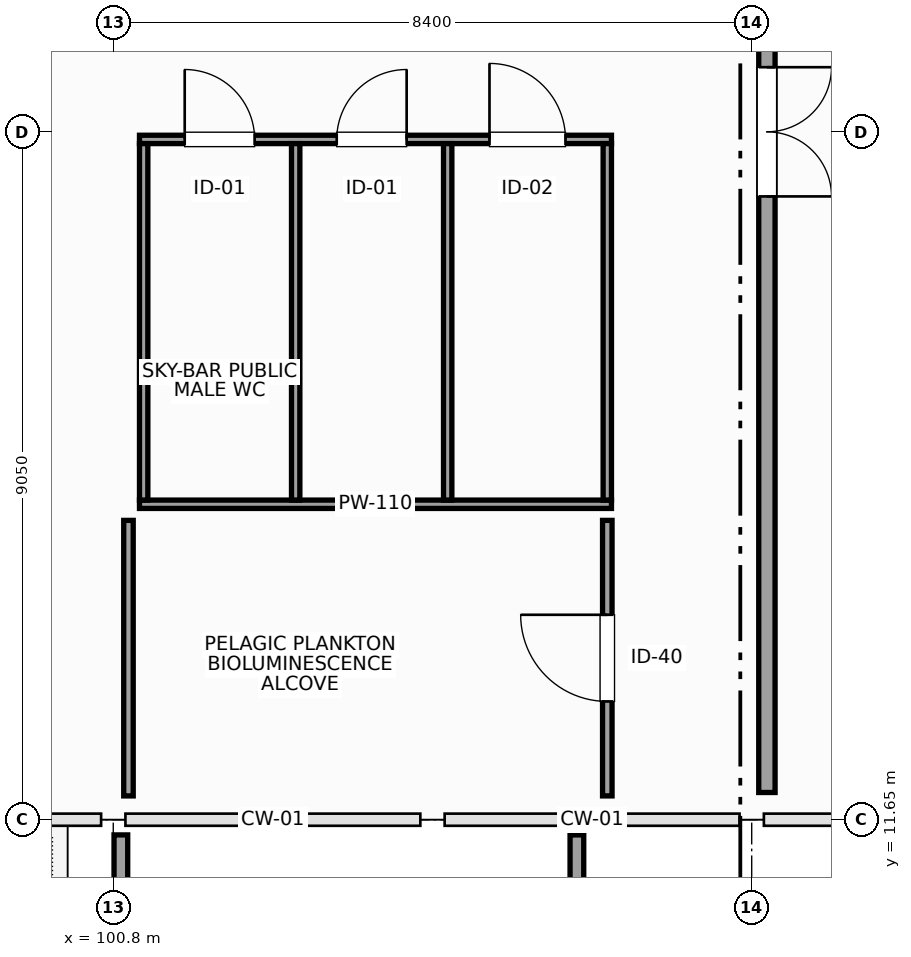
"""IFC4 building model, lengths in metres.
Left out: names, types, materials, properties, quantities, classifications, styles, units other than length and angle.
Written with IfcOpenShell. Run it as: python <this file> out.ifc"""

import sys

from ifc_helpers import new_model, si_unit, direction, frame, frame_2d, origin, place, context, subcontext, project, spatial, rectangle, extrude, element, fill, save


model = new_model("IFC4")
c1 = context("Model", 3, precision=1e-05, world=origin(), true_north=direction((0.0, 1.0)))
c2 = subcontext(c1, "Body", "Model", "MODEL_VIEW")
j1 = project(units=[si_unit("LENGTHUNIT", "METRE"), si_unit("PLANEANGLEUNIT", "RADIAN")], contexts=[c1])
p1 = place(None, origin())
s1 = spatial("IfcSite", under=j1, at=p1, CompositionType="ELEMENT")
p2 = place(p1, origin())
s2 = spatial("IfcBuilding", under=s1, at=p2, CompositionType="ELEMENT")
p3 = place(p2, frame((0.0, 0.0, 24.6)))
s3 = spatial("IfcBuildingStorey", under=s2, at=p3, CompositionType="ELEMENT", Elevation=24.6)
p4 = place(p3, frame((100.9, 2.8, 0.0), z_axis=(0.0, 0.0, 1.0), x_axis=(0.0, 1.0, 0.0)))
e1 = element("IfcWall", 1, at=p4, inside=s3, PredefinedType="PARAPET", context=c2, shape_type="SweptSolid", body=[
    extrude(rectangle(XDim=8.65, YDim=0.18, at=frame_2d((4.325, 0.0))), origin(), (0.0, 0.0, 1.0), 1.12),
])
p5 = place(p3, frame((106.9, 11.45, 0.0), z_axis=(0.0, 0.0, 1.0), x_axis=(0.0, -1.0, 0.0)))
e2 = element("IfcWall", 2, at=p5, inside=s3, PredefinedType="PARAPET", context=c2, shape_type="SweptSolid", body=[
    extrude(rectangle(XDim=1.7, YDim=0.18, at=frame_2d((0.85, 0.0))), origin(), (0.0, 0.0, 1.0), 1.12),
])
p6 = place(p3, frame((101.145, 20.6, 0.0), z_axis=(0.0, 0.0, 1.0), x_axis=(1.0, 0.0, 0.0)))
e3 = element("IfcWall", 3, at=p6, inside=s3, PredefinedType="PARTITIONING", context=c2, shape_type="SweptSolid", body=[
    extrude(rectangle(XDim=6.21, YDim=0.11, at=frame_2d((3.105, 0.0))), origin(), (0.0, 0.0, 1.0), 4.568),
])
p7 = place(p6, frame((0.595, 0.0, 0.0)))
e4 = element("IfcOpeningElement", 4, at=p7, cuts=e3, PredefinedType="OPENING", context=c2, shape_type="SweptSolid", body=[
    extrude(rectangle(XDim=0.92, YDim=2.1, at=frame_2d((0.46, 1.05))), frame((0.0, 0.065, 0.0), z_axis=(0.0, -1.0, 0.0), x_axis=(1.0, 0.0, 0.0)), (0.0, 0.0, 1.0), 0.13),
])
p8 = place(p6, frame((2.595, 0.0, 0.0)))
e5 = element("IfcOpeningElement", 5, at=p8, cuts=e3, PredefinedType="OPENING", context=c2, shape_type="SweptSolid", body=[
    extrude(rectangle(XDim=0.92, YDim=2.1, at=frame_2d((0.46, 1.05))), frame((0.0, 0.065, 0.0), z_axis=(0.0, -1.0, 0.0), x_axis=(1.0, 0.0, 0.0)), (0.0, 0.0, 1.0), 0.13),
])
p9 = place(p6, frame((4.605, 0.0, 0.0)))
e6 = element("IfcOpeningElement", 6, at=p9, cuts=e3, PredefinedType="OPENING", context=c2, shape_type="SweptSolid", body=[
    extrude(rectangle(XDim=1.0, YDim=2.15, at=frame_2d((0.5, 1.075))), frame((0.0, 0.065, 0.0), z_axis=(0.0, -1.0, 0.0), x_axis=(1.0, 0.0, 0.0)), (0.0, 0.0, 1.0), 0.13),
])
p10 = place(p3, frame((101.145, 15.8, 0.0), z_axis=(0.0, 0.0, 1.0), x_axis=(1.0, 0.0, 0.0)))
e7 = element("IfcWall", 7, at=p10, inside=s3, PredefinedType="PARTITIONING", context=c2, shape_type="SweptSolid", body=[
    extrude(rectangle(XDim=6.21, YDim=0.11, at=frame_2d((3.105, 0.0))), origin(), (0.0, 0.0, 1.0), 4.568),
])
for number, where, z_axis, x_axis in (
    (8, (101.2, 15.855, 0.0), (0.0, 0.0, 1.0), (0.0, 1.0, 0.0)),
    (9, (103.2, 15.855, 0.0), (0.0, 0.0, 1.0), (0.0, 1.0, 0.0)),
    (10, (105.2, 15.855, 0.0), (0.0, 0.0, 1.0), (0.0, 1.0, 0.0)),
    (11, (107.3, 15.855, 0.0), (0.0, 0.0, 1.0), (0.0, 1.0, 0.0)),
):
    element("IfcWall", number, at=place(p3, frame(where, z_axis=z_axis, x_axis=x_axis)), inside=s3, PredefinedType="PARTITIONING", context=c2, shape_type="SweptSolid", body=[
        extrude(rectangle(XDim=4.69, YDim=0.11, at=frame_2d((2.345, 0.0))), origin(), (0.0, 0.0, 1.0), 4.568),
    ])
p11 = place(p3, frame((107.3, 11.963, 0.0), z_axis=(0.0, 0.0, 1.0), x_axis=(0.0, 1.0, 0.0)))
e12 = element("IfcWall", 12, at=p11, inside=s3, PredefinedType="PARTITIONING", context=c2, shape_type="SweptSolid", body=[
    extrude(rectangle(XDim=3.625, YDim=0.125, at=frame_2d((1.812, 0.0))), origin(), (0.0, 0.0, 1.0), 4.94),
])
p12 = place(p11, frame((1.243, 0.0, 0.0)))
e13 = element("IfcOpeningElement", 13, at=p12, cuts=e12, PredefinedType="OPENING", context=c2, shape_type="SweptSolid", body=[
    extrude(rectangle(XDim=1.14, YDim=2.28, at=frame_2d((0.57, 1.14))), frame((0.0, 0.073, 0.0), z_axis=(0.0, -1.0, 0.0), x_axis=(1.0, 0.0, 0.0)), (0.0, 0.0, 1.0), 0.145),
])
p13 = place(p3, frame((101.0, 11.963, 0.0), z_axis=(0.0, 0.0, 1.0), x_axis=(0.0, 1.0, 0.0)))
e14 = element("IfcWall", 14, at=p13, inside=s3, PredefinedType="PARTITIONING", context=c2, shape_type="SweptSolid", body=[
    extrude(rectangle(XDim=3.625, YDim=0.125, at=frame_2d((1.812, 0.0))), origin(), (0.0, 0.0, 1.0), 4.568),
])
p14 = place(p3, frame((109.4, 12.008, 0.0), z_axis=(0.0, 0.0, 1.0), x_axis=(0.0, 1.0, 0.0)))
e15 = element("IfcWall", 15, at=p14, inside=s3, PredefinedType="PARTITIONING", context=c2, shape_type="SweptSolid", body=[
    extrude(rectangle(XDim=17.384, YDim=0.215, at=frame_2d((8.692, 0.0))), origin(), (0.0, 0.0, 1.0), 4.568),
])
p15 = place(p14, frame((7.842, 0.0, 0.0)))
e16 = element("IfcOpeningElement", 16, at=p15, cuts=e15, PredefinedType="OPENING", context=c2, shape_type="SweptSolid", body=[
    extrude(rectangle(XDim=1.7, YDim=2.42, at=frame_2d((0.85, 1.21))), frame((0.0, 0.118, 0.0), z_axis=(0.0, -1.0, 0.0), x_axis=(1.0, 0.0, 0.0)), (0.0, 0.0, 1.0), 0.235),
])
p16 = place(p14, frame((10.142, 0.0, 1.05)))
e17 = element("IfcOpeningElement", 17, at=p16, cuts=e15, PredefinedType="OPENING", context=c2, shape_type="SweptSolid", body=[
    extrude(rectangle(XDim=1.5, YDim=1.2, at=frame_2d((0.75, 0.6))), frame((0.0, 0.118, 0.0), z_axis=(0.0, -1.0, 0.0), x_axis=(1.0, 0.0, 0.0)), (0.0, 0.0, 1.0), 0.235),
])
p17 = place(p7, origin())
e18 = element("IfcDoor", 18, at=p17, inside=s3, OperationType="SINGLE_SWING_LEFT", PredefinedType="DOOR", context=c2, shape_type="SweptSolid", body=[
    extrude(rectangle(XDim=0.92, YDim=2.1, at=frame_2d((0.46, 1.05))), frame((0.0, 0.025, 0.0), z_axis=(0.0, -1.0, 0.0), x_axis=(1.0, 0.0, 0.0)), (0.0, 0.0, 1.0), 0.05),
])
fill(e4, e18)
p18 = place(p8, origin())
e19 = element("IfcDoor", 19, at=p18, inside=s3, OperationType="SINGLE_SWING_RIGHT", PredefinedType="DOOR", context=c2, shape_type="SweptSolid", body=[
    extrude(rectangle(XDim=0.92, YDim=2.1, at=frame_2d((0.46, 1.05))), frame((0.0, 0.025, 0.0), z_axis=(0.0, -1.0, 0.0), x_axis=(1.0, 0.0, 0.0)), (0.0, 0.0, 1.0), 0.05),
])
fill(e5, e19)
p19 = place(p9, origin())
e20 = element("IfcDoor", 20, at=p19, inside=s3, OperationType="SINGLE_SWING_LEFT", PredefinedType="DOOR", context=c2, shape_type="SweptSolid", body=[
    extrude(rectangle(XDim=1.0, YDim=2.15, at=frame_2d((0.5, 1.075))), frame((0.0, 0.025, 0.0), z_axis=(0.0, -1.0, 0.0), x_axis=(1.0, 0.0, 0.0)), (0.0, 0.0, 1.0), 0.05),
])
fill(e6, e20)
p20 = place(p12, origin())
e21 = element("IfcDoor", 21, at=p20, inside=s3, OperationType="SINGLE_SWING_RIGHT", PredefinedType="DOOR", context=c2, shape_type="SweptSolid", body=[
    extrude(rectangle(XDim=1.14, YDim=2.28, at=frame_2d((0.57, 1.14))), frame((0.0, 0.025, 0.0), z_axis=(0.0, -1.0, 0.0), x_axis=(1.0, 0.0, 0.0)), (0.0, 0.0, 1.0), 0.05),
])
fill(e13, e21)
p21 = place(p15, frame((1.7, 0.0, 0.0), z_axis=(0.0, 0.0, 1.0), x_axis=(-1.0, 0.0, 0.0)))
e22 = element("IfcDoor", 22, at=p21, inside=s3, OperationType="DOUBLE_DOOR_SINGLE_SWING", PredefinedType="DOOR", context=c2, shape_type="SweptSolid", body=[
    extrude(rectangle(XDim=1.7, YDim=2.42, at=frame_2d((0.85, 1.21))), frame((0.0, 0.025, 0.0), z_axis=(0.0, -1.0, 0.0), x_axis=(1.0, 0.0, 0.0)), (0.0, 0.0, 1.0), 0.05),
])
fill(e16, e22)
save(model, sys.argv[1])
